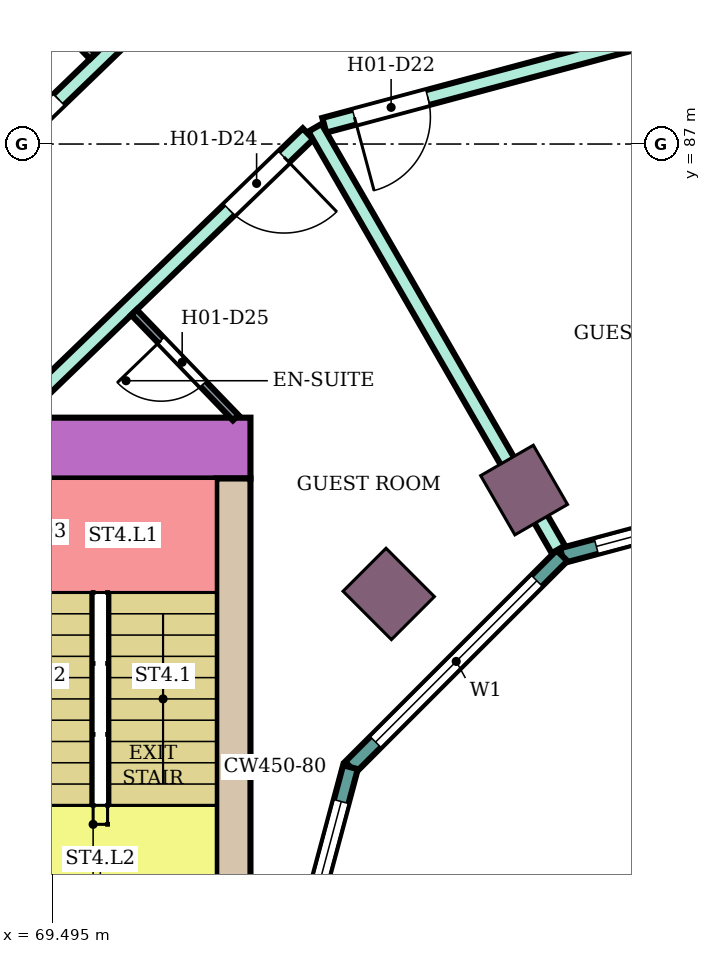
"""IFC4 building model, lengths in metres.
Left out: names, types, materials, properties, quantities, classifications, styles, units other than length and angle.
Written with IfcOpenShell. Run it as: python <this file> out.ifc"""

import sys

from ifc_helpers import new_model, si_unit, direction, frame, frame_2d, origin, origin_2d, place, context, subcontext, project, spatial, rectangle, extrude, element, fill, save


model = new_model("IFC4")
c1 = context("Model", 3, precision=1e-05, world=origin(), true_north=direction((0.0, 1.0)))
c2 = subcontext(c1, "Body", "Model", "MODEL_VIEW")
j1 = project(units=[si_unit("LENGTHUNIT", "METRE"), si_unit("PLANEANGLEUNIT", "RADIAN")], contexts=[c1])
p1 = place(None, origin())
s1 = spatial("IfcSite", under=j1, at=p1, CompositionType="ELEMENT")
p2 = place(p1, origin())
s2 = spatial("IfcBuilding", under=s1, at=p2, CompositionType="ELEMENT")
p3 = place(p2, frame((0.0, 0.0, 32.6)))
s3 = spatial("IfcBuildingStorey", under=s2, at=p3, CompositionType="ELEMENT", Elevation=32.6)
for number, where, z_axis, x_axis in (
    (1, (75.7, 82.448, 0.0), (0.0, 0.0, 1.0), (-0.5, 0.866, 0.0)),
    (2, (73.919, 81.081, 0.0), (0.0, 0.0, 1.0), (-0.707, 0.707, 0.0)),
):
    element("IfcColumn", number, at=place(p3, frame(where, z_axis=z_axis, x_axis=x_axis)), inside=s3, PredefinedType="COLUMN", context=c2, shape_type="SweptSolid", body=[
        extrude(rectangle(XDim=0.9, YDim=0.8, at=origin_2d()), origin(), (0.0, 0.0, 1.0), 3.8),
    ])
p4 = place(p3, frame((72.1, 83.0, 0.0), z_axis=(0.0, 0.0, 1.0), x_axis=(-1.0, 0.0, 0.0)))
e3 = element("IfcWall", 3, at=p4, inside=s3, PredefinedType="SHEAR", context=c2, shape_type="SweptSolid", body=[
    extrude(rectangle(XDim=14.7, YDim=0.8, at=frame_2d((7.35, 0.0))), origin(), (0.0, 0.0, 1.0), 3.48),
])
p5 = place(p4, frame((4.2, 0.0, 0.0)))
e4 = element("IfcOpeningElement", 4, at=p5, cuts=e3, PredefinedType="OPENING", context=c2, shape_type="SweptSolid", body=[
    extrude(rectangle(XDim=2.4, YDim=2.4, at=frame_2d((1.2, 1.2))), frame((0.0, 0.41, 0.0), z_axis=(0.0, -1.0, 0.0), x_axis=(1.0, 0.0, 0.0)), (0.0, 0.0, 1.0), 0.82),
])
p6 = place(p3, frame((71.875, 82.6, 0.0), z_axis=(0.0, 0.0, 1.0), x_axis=(0.0, -1.0, 0.0)))
e5 = element("IfcWall", 5, at=p6, inside=s3, PredefinedType="SHEAR", context=c2, shape_type="SweptSolid", body=[
    extrude(rectangle(XDim=7.6, YDim=0.45, at=frame_2d((3.8, 0.0))), origin(), (0.0, 0.0, 1.0), 3.48),
])
p7 = place(p3, frame((80.0, 82.604, 0.0), z_axis=(0.0, 0.0, 1.0), x_axis=(-0.965933654434, -0.258789828301, 0.0)))
e6 = element("IfcWall", 6, at=p7, inside=s3, PredefinedType="NOTDEFINED", context=c2, shape_type="SweptSolid", body=[
    extrude(rectangle(XDim=3.936, YDim=0.2, at=frame_2d((1.968, 0.0))), origin(), (0.0, 0.0, 1.0), 3.8),
])
p8 = place(p7, frame((0.468, 0.0, 0.9)))
e7 = element("IfcOpeningElement", 7, at=p8, cuts=e6, PredefinedType="OPENING", context=c2, shape_type="SweptSolid", body=[
    extrude(rectangle(XDim=3.0, YDim=2.3, at=frame_2d((1.5, 1.15))), frame((0.0, 0.11, 0.0), z_axis=(0.0, -1.0, 0.0), x_axis=(1.0, 0.0, 0.0)), (0.0, 0.0, 1.0), 0.22),
])
p9 = place(p3, frame((76.198, 81.585, 0.0), z_axis=(0.0, 0.0, 1.0), x_axis=(-0.707106781187, -0.707106781187, 0.0)))
e8 = element("IfcWall", 8, at=p9, inside=s3, PredefinedType="NOTDEFINED", context=c2, shape_type="SweptSolid", body=[
    extrude(rectangle(XDim=3.936, YDim=0.2, at=frame_2d((1.968, 0.0))), origin(), (0.0, 0.0, 1.0), 3.8),
])
p10 = place(p9, frame((0.468, 0.0, 0.9)))
e9 = element("IfcOpeningElement", 9, at=p10, cuts=e8, PredefinedType="OPENING", context=c2, shape_type="SweptSolid", body=[
    extrude(rectangle(XDim=3.0, YDim=2.3, at=frame_2d((1.5, 1.15))), frame((0.0, 0.11, 0.0), z_axis=(0.0, -1.0, 0.0), x_axis=(1.0, 0.0, 0.0)), (0.0, 0.0, 1.0), 0.22),
])
p11 = place(p3, frame((73.415, 78.802, 0.0), z_axis=(0.0, 0.0, 1.0), x_axis=(-0.258789828301, -0.965933654434, 0.0)))
e10 = element("IfcWall", 10, at=p11, inside=s3, PredefinedType="NOTDEFINED", context=c2, shape_type="SweptSolid", body=[
    extrude(rectangle(XDim=3.936, YDim=0.2, at=frame_2d((1.968, 0.0))), origin(), (0.0, 0.0, 1.0), 3.8),
])
p12 = place(p11, frame((0.468, 0.0, 0.9)))
e11 = element("IfcOpeningElement", 11, at=p12, cuts=e10, PredefinedType="OPENING", context=c2, shape_type="SweptSolid", body=[
    extrude(rectangle(XDim=3.0, YDim=2.3, at=frame_2d((1.5, 1.15))), frame((0.0, 0.11, 0.0), z_axis=(0.0, -1.0, 0.0), x_axis=(1.0, 0.0, 0.0)), (0.0, 0.0, 1.0), 0.22),
])
p13 = place(p3, frame((66.796, 84.9, 0.0), z_axis=(0.0, 0.0, 1.0), x_axis=(0.719690131178, 0.694295409092, 0.0)))
e12 = element("IfcWall", 12, at=p13, inside=s3, PredefinedType="PARTITIONING", context=c2, shape_type="SweptSolid", body=[
    extrude(rectangle(XDim=6.585, YDim=0.2, at=frame_2d((3.293, 0.0))), origin(), (0.0, 0.0, 1.0), 3.35),
])
p14 = place(p13, frame((2.867, 0.0, 0.0)))
e13 = element("IfcOpeningElement", 13, at=p14, cuts=e12, PredefinedType="OPENING", context=c2, shape_type="SweptSolid", body=[
    extrude(rectangle(XDim=1.0, YDim=2.1, at=frame_2d((0.5, 1.05))), frame((0.0, 0.11, 0.0), z_axis=(0.0, -1.0, 0.0), x_axis=(1.0, 0.0, 0.0)), (0.0, 0.0, 1.0), 0.22),
])
p15 = place(p3, frame((68.987, 83.4, 0.0), z_axis=(0.0, 0.0, 1.0), x_axis=(0.719591503389, 0.694397629784, 0.0)))
e14 = element("IfcWall", 14, at=p15, inside=s3, PredefinedType="PARTITIONING", context=c2, shape_type="SweptSolid", body=[
    extrude(rectangle(XDim=5.378, YDim=0.2, at=frame_2d((2.689, 0.0))), origin(), (0.0, 0.0, 1.0), 3.35),
])
p16 = place(p15, frame((3.938, 0.0, 0.0)))
e15 = element("IfcOpeningElement", 15, at=p16, cuts=e14, PredefinedType="OPENING", context=c2, shape_type="SweptSolid", body=[
    extrude(rectangle(XDim=1.0, YDim=2.1, at=frame_2d((0.5, 1.05))), frame((0.0, 0.11, 0.0), z_axis=(0.0, -1.0, 0.0), x_axis=(1.0, 0.0, 0.0)), (0.0, 0.0, 1.0), 0.22),
])
p17 = place(p3, frame((73.071, 87.247, 0.0), z_axis=(0.0, 0.0, 1.0), x_axis=(0.965931651205, 0.258797305243, 0.0)))
e16 = element("IfcWall", 16, at=p17, inside=s3, PredefinedType="PARTITIONING", context=c2, shape_type="SweptSolid", body=[
    extrude(rectangle(XDim=7.043, YDim=0.2, at=frame_2d((3.521, 0.0))), origin(), (0.0, 0.0, 1.0), 3.35),
])
p18 = place(p17, frame((0.41, 0.0, 0.0)))
e17 = element("IfcOpeningElement", 17, at=p18, cuts=e16, PredefinedType="OPENING", context=c2, shape_type="SweptSolid", body=[
    extrude(rectangle(XDim=1.0, YDim=2.1, at=frame_2d((0.5, 1.05))), frame((0.0, 0.11, 0.0), z_axis=(0.0, -1.0, 0.0), x_axis=(1.0, 0.0, 0.0)), (0.0, 0.0, 1.0), 0.22),
])
p19 = place(p3, frame((72.948, 87.214, 0.0), z_axis=(0.0, 0.0, 1.0), x_axis=(0.499943524694, -0.866058007363, 0.0)))
e18 = element("IfcWall", 18, at=p19, inside=s3, PredefinedType="PARTITIONING", context=c2, shape_type="SweptSolid", body=[
    extrude(rectangle(XDim=6.405, YDim=0.2, at=frame_2d((3.203, 0.0))), origin(), (0.0, 0.0, 1.0), 3.35),
])
p20 = place(p3, frame((68.185, 90.06, 0.0), z_axis=(0.0, 0.0, 1.0), x_axis=(0.69446127412, -0.719530081892, 0.0)))
e19 = element("IfcWall", 19, at=p20, inside=s3, PredefinedType="PARTITIONING", context=c2, shape_type="SweptSolid", body=[
    extrude(rectangle(XDim=2.649, YDim=0.1, at=frame_2d((1.324, 0.0))), origin(), (0.0, 0.0, 1.0), 3.35),
])
p21 = place(p20, frame((0.95, 0.0, 0.0)))
e20 = element("IfcOpeningElement", 20, at=p21, cuts=e19, PredefinedType="OPENING", context=c2, shape_type="SweptSolid", body=[
    extrude(rectangle(XDim=0.8, YDim=2.1, at=frame_2d((0.4, 1.05))), frame((0.0, 0.06, 0.0), z_axis=(0.0, -1.0, 0.0), x_axis=(1.0, 0.0, 0.0)), (0.0, 0.0, 1.0), 0.12),
])
p22 = place(p3, frame((70.567, 84.786, 0.0), z_axis=(0.0, 0.0, 1.0), x_axis=(0.694447472534, -0.719543402368, 0.0)))
e21 = element("IfcWall", 21, at=p22, inside=s3, PredefinedType="PARTITIONING", context=c2, shape_type="SweptSolid", body=[
    extrude(rectangle(XDim=1.926, YDim=0.1, at=frame_2d((0.963, 0.0))), origin(), (0.0, 0.0, 1.0), 3.35),
])
p23 = place(p22, frame((0.513, 0.0, 0.0)))
e22 = element("IfcOpeningElement", 22, at=p23, cuts=e21, PredefinedType="OPENING", context=c2, shape_type="SweptSolid", body=[
    extrude(rectangle(XDim=0.8, YDim=2.1, at=frame_2d((0.4, 1.05))), frame((0.0, 0.06, 0.0), z_axis=(0.0, -1.0, 0.0), x_axis=(1.0, 0.0, 0.0)), (0.0, 0.0, 1.0), 0.12),
])
p24 = place(p8, origin())
e23 = element("IfcWindow", 23, at=p24, inside=s3, PartitioningType="SINGLE_PANEL", PredefinedType="WINDOW", context=c2, shape_type="SweptSolid", body=[
    extrude(rectangle(XDim=3.0, YDim=2.3, at=frame_2d((1.5, 1.15))), frame((0.0, 0.03, 0.0), z_axis=(0.0, -1.0, 0.0), x_axis=(1.0, 0.0, 0.0)), (0.0, 0.0, 1.0), 0.06),
])
fill(e7, e23)
p25 = place(p10, origin())
e24 = element("IfcWindow", 24, at=p25, inside=s3, PartitioningType="SINGLE_PANEL", PredefinedType="WINDOW", context=c2, shape_type="SweptSolid", body=[
    extrude(rectangle(XDim=3.0, YDim=2.3, at=frame_2d((1.5, 1.15))), frame((0.0, 0.03, 0.0), z_axis=(0.0, -1.0, 0.0), x_axis=(1.0, 0.0, 0.0)), (0.0, 0.0, 1.0), 0.06),
])
fill(e9, e24)
p26 = place(p12, origin())
e25 = element("IfcWindow", 25, at=p26, inside=s3, PartitioningType="SINGLE_PANEL", PredefinedType="WINDOW", context=c2, shape_type="SweptSolid", body=[
    extrude(rectangle(XDim=3.0, YDim=2.3, at=frame_2d((1.5, 1.15))), frame((0.0, 0.03, 0.0), z_axis=(0.0, -1.0, 0.0), x_axis=(1.0, 0.0, 0.0)), (0.0, 0.0, 1.0), 0.06),
])
fill(e11, e25)
p27 = place(p14, origin())
e26 = element("IfcDoor", 26, at=p27, inside=s3, OperationType="SINGLE_SWING_LEFT", PredefinedType="DOOR", context=c2, shape_type="SweptSolid", body=[
    extrude(rectangle(XDim=1.0, YDim=2.1, at=frame_2d((0.5, 1.05))), frame((0.0, 0.025, 0.0), z_axis=(0.0, -1.0, 0.0), x_axis=(1.0, 0.0, 0.0)), (0.0, 0.0, 1.0), 0.05),
])
fill(e13, e26)
p28 = place(p18, frame((1.0, 0.0, 0.0), z_axis=(0.0, 0.0, 1.0), x_axis=(-1.0, 0.0, 0.0)))
e27 = element("IfcDoor", 27, at=p28, inside=s3, OperationType="SINGLE_SWING_RIGHT", PredefinedType="DOOR", context=c2, shape_type="SweptSolid", body=[
    extrude(rectangle(XDim=1.0, YDim=2.1, at=frame_2d((0.5, 1.05))), frame((0.0, 0.025, 0.0), z_axis=(0.0, -1.0, 0.0), x_axis=(1.0, 0.0, 0.0)), (0.0, 0.0, 1.0), 0.05),
])
fill(e17, e27)
p29 = place(p16, frame((1.0, 0.0, 0.0), z_axis=(0.0, 0.0, 1.0), x_axis=(-1.0, 0.0, 0.0)))
e28 = element("IfcDoor", 28, at=p29, inside=s3, OperationType="SINGLE_SWING_LEFT", PredefinedType="DOOR", context=c2, shape_type="SweptSolid", body=[
    extrude(rectangle(XDim=1.0, YDim=2.1, at=frame_2d((0.5, 1.05))), frame((0.0, 0.025, 0.0), z_axis=(0.0, -1.0, 0.0), x_axis=(1.0, 0.0, 0.0)), (0.0, 0.0, 1.0), 0.05),
])
fill(e15, e28)
p30 = place(p23, frame((0.8, 0.0, 0.0), z_axis=(0.0, 0.0, 1.0), x_axis=(-1.0, 0.0, 0.0)))
e29 = element("IfcDoor", 29, at=p30, inside=s3, OperationType="SINGLE_SWING_RIGHT", PredefinedType="DOOR", context=c2, shape_type="SweptSolid", body=[
    extrude(rectangle(XDim=0.8, YDim=2.1, at=frame_2d((0.4, 1.05))), frame((0.0, 0.025, 0.0), z_axis=(0.0, -1.0, 0.0), x_axis=(1.0, 0.0, 0.0)), (0.0, 0.0, 1.0), 0.05),
])
fill(e22, e29)
save(model, sys.argv[1])
